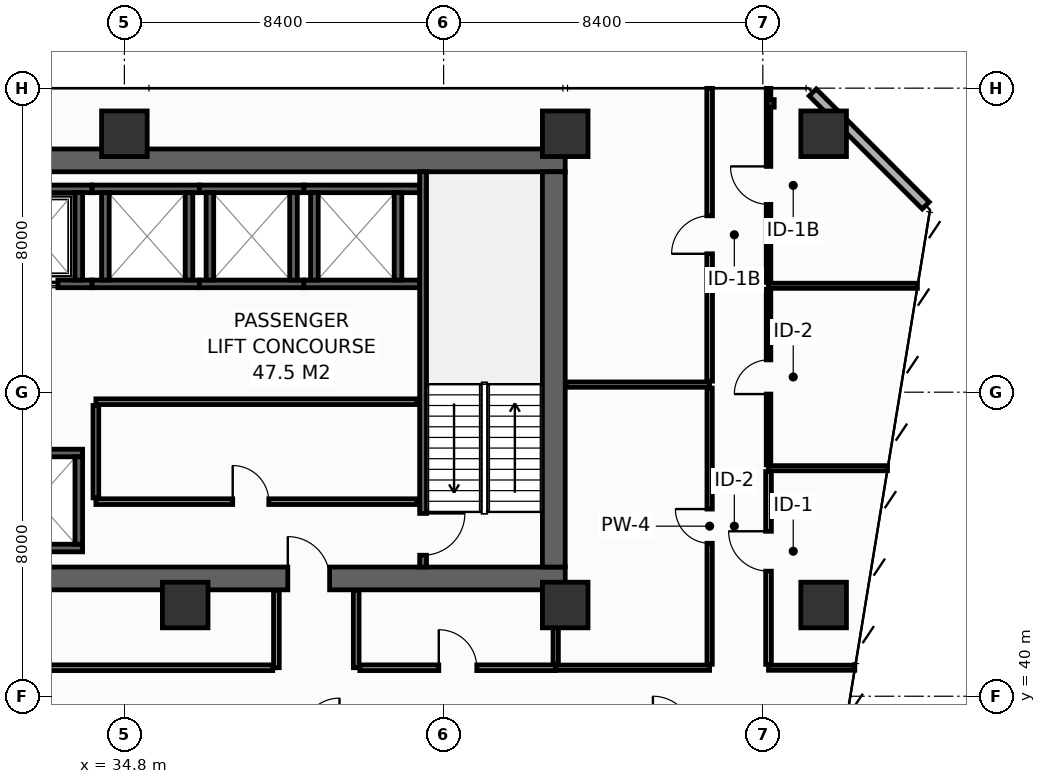
"""IFC4 building model, lengths in metres.
Left out: names, types, materials, properties, quantities, classifications, styles, units other than length and angle.
Written with IfcOpenShell. Run it as: python <this file> out.ifc"""

import sys

from ifc_helpers import new_model, si_unit, direction, frame, frame_2d, origin, origin_2d, place, context, subcontext, project, spatial, rectangle, hollow_rectangle, extrude, element, fill, save


model = new_model("IFC4")
c1 = context("Model", 3, precision=1e-05, world=origin(), true_north=direction((0.0, 1.0)))
c2 = subcontext(c1, "Body", "Model", "MODEL_VIEW")
j1 = project(units=[si_unit("LENGTHUNIT", "METRE"), si_unit("PLANEANGLEUNIT", "RADIAN")], contexts=[c1])
p1 = place(None, origin())
s1 = spatial("IfcSite", under=j1, at=p1, CompositionType="ELEMENT")
p2 = place(p1, origin())
s2 = spatial("IfcBuilding", under=s1, at=p2, CompositionType="ELEMENT")
p3 = place(p2, frame((0.0, 0.0, 82.4)))
s3 = spatial("IfcBuildingStorey", under=s2, at=p3, CompositionType="ELEMENT", Elevation=82.4)
p4 = place(p3, frame((13.5, 43.1, 0.0), z_axis=(0.0, 0.0, 1.0), x_axis=(1.0, 0.0, 0.0)))
e1 = element("IfcWall", 1, at=p4, inside=s3, PredefinedType="SHEAR", context=c2, shape_type="SweptSolid", body=[
    extrude(rectangle(XDim=32.9, YDim=0.6, at=frame_2d((16.45, 0.0))), origin(), (0.0, 0.0, 1.0), 3.95),
])
p5 = place(p4, frame((5.4, 0.0, 0.0)))
e2 = element("IfcOpeningElement", 2, at=p5, cuts=e1, PredefinedType="OPENING", context=c2, shape_type="SweptSolid", body=[
    extrude(rectangle(XDim=1.1, YDim=2.15, at=frame_2d((0.55, 1.075))), frame((0.0, 0.31, 0.0), z_axis=(0.0, -1.0, 0.0), x_axis=(1.0, 0.0, 0.0)), (0.0, 0.0, 1.0), 0.62),
])
p6 = place(p4, frame((25.6, 0.0, 0.0)))
e3 = element("IfcOpeningElement", 3, at=p6, cuts=e1, PredefinedType="OPENING", context=c2, shape_type="SweptSolid", body=[
    extrude(rectangle(XDim=1.1, YDim=2.15, at=frame_2d((0.55, 1.075))), frame((0.0, 0.31, 0.0), z_axis=(0.0, -1.0, 0.0), x_axis=(1.0, 0.0, 0.0)), (0.0, 0.0, 1.0), 0.62),
])
p7 = place(p3, frame((13.5, 54.1, 0.0), z_axis=(0.0, 0.0, 1.0), x_axis=(1.0, 0.0, 0.0)))
e4 = element("IfcWall", 4, at=p7, inside=s3, PredefinedType="SHEAR", context=c2, shape_type="SweptSolid", body=[
    extrude(rectangle(XDim=32.9, YDim=0.6, at=frame_2d((16.45, 0.0))), origin(), (0.0, 0.0, 1.0), 3.95),
])
p8 = place(p3, frame((46.1, 43.4, 0.0), z_axis=(0.0, 0.0, 1.0), x_axis=(0.0, 1.0, 0.0)))
e5 = element("IfcWall", 5, at=p8, inside=s3, PredefinedType="SHEAR", context=c2, shape_type="SweptSolid", body=[
    extrude(rectangle(XDim=10.4, YDim=0.6, at=frame_2d((5.2, 0.0))), origin(), (0.0, 0.0, 1.0), 3.95),
])
for number, where, z_axis, x_axis in (
    (6, (34.8, 54.8, 0.0), (0.0, 0.0, 1.0), (1.0, 0.0, 0.0)),
    (7, (46.4, 54.8, 0.0), (0.0, 0.0, 1.0), (1.0, 0.0, 0.0)),
    (8, (53.2, 54.8, 0.0), (0.0, 0.0, 1.0), (1.0, 0.0, 0.0)),
    (9, (36.4, 42.4, 0.0), (0.0, 0.0, 1.0), (1.0, 0.0, 0.0)),
    (10, (46.4, 42.4, 0.0), (0.0, 0.0, 1.0), (1.0, 0.0, 0.0)),
    (11, (53.2, 42.4, 0.0), (0.0, 0.0, 1.0), (1.0, 0.0, 0.0)),
):
    element("IfcColumn", number, at=place(p3, frame(where, z_axis=z_axis, x_axis=x_axis)), inside=s3, PredefinedType="COLUMN", context=c2, shape_type="SweptSolid", body=[
        extrude(hollow_rectangle(XDim=1.2, YDim=1.2, WallThickness=0.055, at=origin_2d()), origin(), (0.0, 0.0, 1.0), 4.4),
    ])
p9 = place(p3, frame((51.8, 55.6, 0.0), z_axis=(0.0, 0.0, 1.0), x_axis=(1.0, 0.0, 0.0)))
e12 = element("IfcColumn", 12, at=p9, inside=s3, PredefinedType="PILASTER", context=c2, shape_type="SweptSolid", body=[
    extrude(hollow_rectangle(XDim=0.2, YDim=0.2, WallThickness=0.01, at=origin_2d()), origin(), (0.0, 0.0, 1.0), 4.4),
])
p10 = place(p3, frame((31.125, 50.85, 0.0), z_axis=(0.0, 0.0, 1.0), x_axis=(1.0, 0.0, 0.0)))
e13 = element("IfcWall", 13, at=p10, inside=s3, PredefinedType="SHEAR", context=c2, shape_type="SweptSolid", body=[
    extrude(rectangle(XDim=2.825, YDim=0.2, at=frame_2d((1.413, 0.0))), origin(), (0.0, 0.0, 1.0), 3.95),
])
p11 = place(p10, frame((0.825, 0.0, 0.0)))
e14 = element("IfcOpeningElement", 14, at=p11, cuts=e13, PredefinedType="OPENING", context=c2, shape_type="SweptSolid", body=[
    extrude(rectangle(XDim=1.1, YDim=2.2, at=frame_2d((0.55, 1.1))), frame((0.0, 0.11, 0.0), z_axis=(0.0, -1.0, 0.0), x_axis=(1.0, 0.0, 0.0)), (0.0, 0.0, 1.0), 0.22),
])
p12 = place(p3, frame((31.125, 53.35, 0.0), z_axis=(0.0, 0.0, 1.0), x_axis=(1.0, 0.0, 0.0)))
e15 = element("IfcWall", 15, at=p12, inside=s3, PredefinedType="SHEAR", context=c2, shape_type="SweptSolid", body=[
    extrude(rectangle(XDim=2.825, YDim=0.2, at=frame_2d((1.413, 0.0))), origin(), (0.0, 0.0, 1.0), 3.95),
])
p13 = place(p3, frame((33.6, 50.95, 0.0), z_axis=(0.0, 0.0, 1.0), x_axis=(0.0, 1.0, 0.0)))
e16 = element("IfcWall", 16, at=p13, inside=s3, PredefinedType="SHEAR", context=c2, shape_type="SweptSolid", body=[
    extrude(rectangle(XDim=2.3, YDim=0.2, at=frame_2d((1.15, 0.0))), origin(), (0.0, 0.0, 1.0), 3.95),
])
for number, where, z_axis, x_axis in (
    (17, (31.125, 43.9, 0.0), (0.0, 0.0, 1.0), (1.0, 0.0, 0.0)),
    (18, (31.125, 46.4, 0.0), (0.0, 0.0, 1.0), (1.0, 0.0, 0.0)),
):
    element("IfcWall", number, at=place(p3, frame(where, z_axis=z_axis, x_axis=x_axis)), inside=s3, PredefinedType="SHEAR", context=c2, shape_type="SweptSolid", body=[
        extrude(rectangle(XDim=2.575, YDim=0.2, at=frame_2d((1.288, 0.0))), origin(), (0.0, 0.0, 1.0), 3.95),
    ])
p14 = place(p3, frame((33.6, 44.0, 0.0), z_axis=(0.0, 0.0, 1.0), x_axis=(0.0, 1.0, 0.0)))
e19 = element("IfcWall", 19, at=p14, inside=s3, PredefinedType="SHEAR", context=c2, shape_type="SweptSolid", body=[
    extrude(rectangle(XDim=2.3, YDim=0.2, at=frame_2d((1.15, 0.0))), origin(), (0.0, 0.0, 1.0), 3.95),
])
for number, where, z_axis, x_axis in (
    (20, (33.95, 50.85, 0.0), (0.0, 0.0, 1.0), (1.0, 0.0, 0.0)),
    (21, (33.95, 53.35, 0.0), (0.0, 0.0, 1.0), (1.0, 0.0, 0.0)),
):
    element("IfcWall", number, at=place(p3, frame(where, z_axis=z_axis, x_axis=x_axis)), inside=s3, PredefinedType="SHEAR", context=c2, shape_type="SweptSolid", body=[
        extrude(rectangle(XDim=2.825, YDim=0.2, at=frame_2d((1.413, 0.0))), origin(), (0.0, 0.0, 1.0), 3.95),
    ])
for number, where, z_axis, x_axis in (
    (22, (34.3, 50.95, 0.0), (0.0, 0.0, 1.0), (0.0, 1.0, 0.0)),
    (23, (36.5, 50.95, 0.0), (0.0, 0.0, 1.0), (0.0, 1.0, 0.0)),
):
    element("IfcWall", number, at=place(p3, frame(where, z_axis=z_axis, x_axis=x_axis)), inside=s3, PredefinedType="SHEAR", context=c2, shape_type="SweptSolid", body=[
        extrude(rectangle(XDim=2.3, YDim=0.2, at=frame_2d((1.15, 0.0))), origin(), (0.0, 0.0, 1.0), 3.95),
    ])
for number, where, z_axis, x_axis in (
    (24, (36.775, 50.85, 0.0), (0.0, 0.0, 1.0), (1.0, 0.0, 0.0)),
    (25, (36.775, 53.35, 0.0), (0.0, 0.0, 1.0), (1.0, 0.0, 0.0)),
):
    element("IfcWall", number, at=place(p3, frame(where, z_axis=z_axis, x_axis=x_axis)), inside=s3, PredefinedType="SHEAR", context=c2, shape_type="SweptSolid", body=[
        extrude(rectangle(XDim=2.75, YDim=0.2, at=frame_2d((1.375, 0.0))), origin(), (0.0, 0.0, 1.0), 3.95),
    ])
for number, where, z_axis, x_axis in (
    (26, (37.05, 50.95, 0.0), (0.0, 0.0, 1.0), (0.0, 1.0, 0.0)),
    (27, (39.25, 50.95, 0.0), (0.0, 0.0, 1.0), (0.0, 1.0, 0.0)),
):
    element("IfcWall", number, at=place(p3, frame(where, z_axis=z_axis, x_axis=x_axis)), inside=s3, PredefinedType="SHEAR", context=c2, shape_type="SweptSolid", body=[
        extrude(rectangle(XDim=2.3, YDim=0.2, at=frame_2d((1.15, 0.0))), origin(), (0.0, 0.0, 1.0), 3.95),
    ])
for number, where, z_axis, x_axis in (
    (28, (39.525, 50.85, 0.0), (0.0, 0.0, 1.0), (1.0, 0.0, 0.0)),
    (29, (39.525, 53.35, 0.0), (0.0, 0.0, 1.0), (1.0, 0.0, 0.0)),
):
    element("IfcWall", number, at=place(p3, frame(where, z_axis=z_axis, x_axis=x_axis)), inside=s3, PredefinedType="SHEAR", context=c2, shape_type="SweptSolid", body=[
        extrude(rectangle(XDim=3.045, YDim=0.2, at=frame_2d((1.522, 0.0))), origin(), (0.0, 0.0, 1.0), 3.95),
    ])
for number, where, z_axis, x_axis in (
    (30, (39.8, 50.95, 0.0), (0.0, 0.0, 1.0), (0.0, 1.0, 0.0)),
    (31, (42.0, 50.95, 0.0), (0.0, 0.0, 1.0), (0.0, 1.0, 0.0)),
):
    element("IfcWall", number, at=place(p3, frame(where, z_axis=z_axis, x_axis=x_axis)), inside=s3, PredefinedType="SHEAR", context=c2, shape_type="SweptSolid", body=[
        extrude(rectangle(XDim=2.3, YDim=0.2, at=frame_2d((1.15, 0.0))), origin(), (0.0, 0.0, 1.0), 3.95),
    ])
p15 = place(p3, frame((42.66, 53.8, 0.0), z_axis=(0.0, 0.0, 1.0), x_axis=(0.0, -1.0, 0.0)))
e32 = element("IfcWall", 32, at=p15, inside=s3, PredefinedType="SHEAR", context=c2, shape_type="SweptSolid", body=[
    extrude(rectangle(XDim=10.4, YDim=0.18, at=frame_2d((5.2, 0.0))), origin(), (0.0, 0.0, 1.0), 3.95),
])
p16 = place(p15, frame((8.99, 0.0, 0.0)))
e33 = element("IfcOpeningElement", 33, at=p16, cuts=e32, PredefinedType="OPENING", context=c2, shape_type="SweptSolid", body=[
    extrude(rectangle(XDim=1.1, YDim=2.15, at=frame_2d((0.55, 1.075))), frame((0.0, 0.1, 0.0), z_axis=(0.0, -1.0, 0.0), x_axis=(1.0, 0.0, 0.0)), (0.0, 0.0, 1.0), 0.2),
])
p17 = place(p3, frame((34.05, 45.12, 0.0), z_axis=(0.0, 0.0, 1.0), x_axis=(1.0, 0.0, 0.0)))
e34 = element("IfcWall", 34, at=p17, inside=s3, PredefinedType="PARTITIONING", context=c2, shape_type="SweptSolid", body=[
    extrude(rectangle(XDim=8.45, YDim=0.15, at=frame_2d((4.225, 0.0))), origin(), (0.0, 0.0, 1.0), 3.95),
])
p18 = place(p17, frame((3.6, 0.0, 0.0)))
e35 = element("IfcOpeningElement", 35, at=p18, cuts=e34, PredefinedType="OPENING", context=c2, shape_type="SweptSolid", body=[
    extrude(rectangle(XDim=0.95, YDim=2.15, at=frame_2d((0.475, 1.075))), frame((0.0, 0.085, 0.0), z_axis=(0.0, -1.0, 0.0), x_axis=(1.0, 0.0, 0.0)), (0.0, 0.0, 1.0), 0.17),
])
p19 = place(p3, frame((34.05, 47.75, 0.0), z_axis=(0.0, 0.0, 1.0), x_axis=(1.0, 0.0, 0.0)))
e36 = element("IfcWall", 36, at=p19, inside=s3, PredefinedType="PARTITIONING", context=c2, shape_type="SweptSolid", body=[
    extrude(rectangle(XDim=8.45, YDim=0.15, at=frame_2d((4.225, 0.0))), origin(), (0.0, 0.0, 1.0), 3.95),
])
p20 = place(p3, frame((34.05, 45.22, 0.0), z_axis=(0.0, 0.0, 1.0), x_axis=(0.0, 1.0, 0.0)))
e37 = element("IfcWall", 37, at=p20, inside=s3, PredefinedType="PARTITIONING", context=c2, shape_type="SweptSolid", body=[
    extrude(rectangle(XDim=2.43, YDim=0.15, at=frame_2d((1.215, 0.0))), origin(), (0.0, 0.0, 1.0), 3.95),
])
p21 = place(p3, frame((55.887, 52.913, 0.0), z_axis=(0.0, 0.0, 1.0), x_axis=(-0.707106781187, 0.707106781187, 0.0)))
e38 = element("IfcWall", 38, at=p21, inside=s3, PredefinedType="STANDARD", context=c2, shape_type="SweptSolid", body=[
    extrude(rectangle(XDim=4.206, YDim=0.26, at=frame_2d((2.103, 0.0))), origin(), (0.0, 0.0, 1.0), 3.95),
])
p22 = place(p3, frame((46.15, 40.75, 0.0), z_axis=(0.0, 0.0, 1.0), x_axis=(1.0, 0.0, 0.0)))
e39 = element("IfcWall", 39, at=p22, inside=s3, PredefinedType="PARTITIONING", context=c2, shape_type="SweptSolid", body=[
    extrude(rectangle(XDim=4.05, YDim=0.14, at=frame_2d((2.025, 0.0))), origin(), (0.0, 0.0, 1.0), 3.95),
])
p23 = place(p3, frame((46.15, 40.84, 0.0), z_axis=(0.0, 0.0, 1.0), x_axis=(0.0, 1.0, 0.0)))
e40 = element("IfcWall", 40, at=p23, inside=s3, PredefinedType="PARTITIONING", context=c2, shape_type="SweptSolid", body=[
    extrude(rectangle(XDim=1.94, YDim=0.14, at=frame_2d((0.97, 0.0))), origin(), (0.0, 0.0, 1.0), 3.95),
])
p24 = place(p3, frame((46.42, 48.2, 0.0), z_axis=(0.0, 0.0, 1.0), x_axis=(1.0, 0.0, 0.0)))
e41 = element("IfcWall", 41, at=p24, inside=s3, PredefinedType="PARTITIONING", context=c2, shape_type="SweptSolid", body=[
    extrude(rectangle(XDim=3.78, YDim=0.14, at=frame_2d((1.89, 0.0))), origin(), (0.0, 0.0, 1.0), 3.95),
])
p25 = place(p3, frame((50.2, 40.84, 0.0), z_axis=(0.0, 0.0, 1.0), x_axis=(0.0, 1.0, 0.0)))
e42 = element("IfcWall", 42, at=p25, inside=s3, PredefinedType="PARTITIONING", context=c2, shape_type="SweptSolid", body=[
    extrude(rectangle(XDim=7.27, YDim=0.14, at=frame_2d((3.635, 0.0))), origin(), (0.0, 0.0, 1.0), 3.135),
])
p26 = place(p25, frame((3.185, 0.0, 0.0)))
e43 = element("IfcOpeningElement", 43, at=p26, cuts=e42, PredefinedType="OPENING", context=c2, shape_type="SweptSolid", body=[
    extrude(rectangle(XDim=0.9, YDim=2.1, at=frame_2d((0.45, 1.05))), frame((0.0, 0.08, 0.0), z_axis=(0.0, -1.0, 0.0), x_axis=(1.0, 0.0, 0.0)), (0.0, 0.0, 1.0), 0.16),
])
p27 = place(p3, frame((50.2, 48.29, 0.0), z_axis=(0.0, 0.0, 1.0), x_axis=(0.0, 1.0, 0.0)))
e44 = element("IfcWall", 44, at=p27, inside=s3, PredefinedType="PARTITIONING", context=c2, shape_type="SweptSolid", body=[
    extrude(rectangle(XDim=7.705, YDim=0.15, at=frame_2d((3.853, 0.0))), origin(), (0.0, 0.0, 1.0), 3.235),
])
p28 = place(p27, frame((3.352, 0.0, 0.0)))
e45 = element("IfcOpeningElement", 45, at=p28, cuts=e44, PredefinedType="OPENING", context=c2, shape_type="SweptSolid", body=[
    extrude(rectangle(XDim=1.0, YDim=2.15, at=frame_2d((0.5, 1.075))), frame((0.0, 0.085, 0.0), z_axis=(0.0, -1.0, 0.0), x_axis=(1.0, 0.0, 0.0)), (0.0, 0.0, 1.0), 0.17),
])
p29 = place(p3, frame((51.75, 40.75, 0.0), z_axis=(0.0, 0.0, 1.0), x_axis=(1.0, 0.0, 0.0)))
e46 = element("IfcWall", 46, at=p29, inside=s3, PredefinedType="PARTITIONING", context=c2, shape_type="SweptSolid", body=[
    extrude(rectangle(XDim=2.271, YDim=0.135, at=frame_2d((1.135, 0.0))), origin(), (0.0, 0.0, 1.0), 3.435),
])
p30 = place(p3, frame((51.75, 46.0, 0.0), z_axis=(0.0, 0.0, 1.0), x_axis=(1.0, 0.0, 0.0)))
e47 = element("IfcWall", 47, at=p30, inside=s3, PredefinedType="PARTITIONING", context=c2, shape_type="SweptSolid", body=[
    extrude(rectangle(XDim=3.131, YDim=0.135, at=frame_2d((1.565, 0.0))), origin(), (0.0, 0.0, 1.0), 3.135),
])
p31 = place(p3, frame((51.75, 50.8, 0.0), z_axis=(0.0, 0.0, 1.0), x_axis=(1.0, 0.0, 0.0)))
e48 = element("IfcWall", 48, at=p31, inside=s3, PredefinedType="PARTITIONING", context=c2, shape_type="SweptSolid", body=[
    extrude(rectangle(XDim=3.917, YDim=0.135, at=frame_2d((1.958, 0.0))), origin(), (0.0, 0.0, 1.0), 3.135),
])
p32 = place(p3, frame((51.75, 40.837, 0.0), z_axis=(0.0, 0.0, 1.0), x_axis=(0.0, 1.0, 0.0)))
e49 = element("IfcWall", 49, at=p32, inside=s3, PredefinedType="PARTITIONING", context=c2, shape_type="SweptSolid", body=[
    extrude(rectangle(XDim=5.075, YDim=0.15, at=frame_2d((2.538, 0.0))), origin(), (0.0, 0.0, 1.0), 3.135),
])
p33 = place(p32, frame((2.453, 0.0, 0.0)))
e50 = element("IfcOpeningElement", 50, at=p33, cuts=e49, PredefinedType="OPENING", context=c2, shape_type="SweptSolid", body=[
    extrude(rectangle(XDim=1.05, YDim=2.15, at=frame_2d((0.525, 1.075))), frame((0.0, 0.085, 0.0), z_axis=(0.0, -1.0, 0.0), x_axis=(1.0, 0.0, 0.0)), (0.0, 0.0, 1.0), 0.17),
])
p34 = place(p3, frame((51.75, 46.087, 0.0), z_axis=(0.0, 0.0, 1.0), x_axis=(0.0, 1.0, 0.0)))
e51 = element("IfcWall", 51, at=p34, inside=s3, PredefinedType="PARTITIONING", context=c2, shape_type="SweptSolid", body=[
    extrude(rectangle(XDim=4.625, YDim=0.12, at=frame_2d((2.312, 0.0))), origin(), (0.0, 0.0, 1.0), 3.95),
])
p35 = place(p34, frame((1.863, 0.0, 0.0)))
e52 = element("IfcOpeningElement", 52, at=p35, cuts=e51, PredefinedType="OPENING", context=c2, shape_type="SweptSolid", body=[
    extrude(rectangle(XDim=0.9, YDim=2.1, at=frame_2d((0.45, 1.05))), frame((0.0, 0.07, 0.0), z_axis=(0.0, -1.0, 0.0), x_axis=(1.0, 0.0, 0.0)), (0.0, 0.0, 1.0), 0.14),
])
p36 = place(p3, frame((51.75, 50.887, 0.0), z_axis=(0.0, 0.0, 1.0), x_axis=(0.0, 1.0, 0.0)))
e53 = element("IfcWall", 53, at=p36, inside=s3, PredefinedType="PARTITIONING", context=c2, shape_type="SweptSolid", body=[
    extrude(rectangle(XDim=5.108, YDim=0.12, at=frame_2d((2.554, 0.0))), origin(), (0.0, 0.0, 1.0), 3.235),
])
p37 = place(p36, frame((2.054, 0.0, 0.0)))
e54 = element("IfcOpeningElement", 54, at=p37, cuts=e53, PredefinedType="OPENING", context=c2, shape_type="SweptSolid", body=[
    extrude(rectangle(XDim=1.0, YDim=2.15, at=frame_2d((0.5, 1.075))), frame((0.0, 0.07, 0.0), z_axis=(0.0, -1.0, 0.0), x_axis=(1.0, 0.0, 0.0)), (0.0, 0.0, 1.0), 0.14),
])
for number, where, z_axis, x_axis in (
    (55, (38.8, 40.75, 0.0), (0.0, 0.0, 1.0), (0.0, 1.0, 0.0)),
    (56, (40.9, 40.75, 0.0), (0.0, 0.0, 1.0), (0.0, 1.0, 0.0)),
):
    element("IfcWall", number, at=place(p3, frame(where, z_axis=z_axis, x_axis=x_axis)), inside=s3, PredefinedType="PARTITIONING", context=c2, shape_type="SweptSolid", body=[
        extrude(rectangle(XDim=2.03, YDim=0.15, at=frame_2d((1.015, 0.0))), origin(), (0.0, 0.0, 1.0), 3.95),
    ])
p38 = place(p3, frame((20.795, 40.75, 0.0), z_axis=(0.0, 0.0, 1.0), x_axis=(1.0, 0.0, 0.0)))
e57 = element("IfcWall", 57, at=p38, inside=s3, PredefinedType="PARTITIONING", context=c2, shape_type="SweptSolid", body=[
    extrude(rectangle(XDim=17.91, YDim=0.15, at=frame_2d((8.955, 0.0))), origin(), (0.0, 0.0, 1.0), 3.135),
])
p39 = place(p38, frame((8.455, 0.0, 0.0)))
e58 = element("IfcOpeningElement", 58, at=p39, cuts=e57, PredefinedType="OPENING", context=c2, shape_type="SweptSolid", body=[
    extrude(rectangle(XDim=1.0, YDim=2.15, at=frame_2d((0.5, 1.075))), frame((0.0, 0.085, 0.0), z_axis=(0.0, -1.0, 0.0), x_axis=(1.0, 0.0, 0.0)), (0.0, 0.0, 1.0), 0.17),
])
p40 = place(p3, frame((40.995, 40.75, 0.0), z_axis=(0.0, 0.0, 1.0), x_axis=(1.0, 0.0, 0.0)))
e59 = element("IfcWall", 59, at=p40, inside=s3, PredefinedType="PARTITIONING", context=c2, shape_type="SweptSolid", body=[
    extrude(rectangle(XDim=5.155, YDim=0.15, at=frame_2d((2.577, 0.0))), origin(), (0.0, 0.0, 1.0), 3.95),
])
p41 = place(p40, frame((2.078, 0.0, 0.0)))
e60 = element("IfcOpeningElement", 60, at=p41, cuts=e59, PredefinedType="OPENING", context=c2, shape_type="SweptSolid", body=[
    extrude(rectangle(XDim=1.0, YDim=2.15, at=frame_2d((0.5, 1.075))), frame((0.0, 0.085, 0.0), z_axis=(0.0, -1.0, 0.0), x_axis=(1.0, 0.0, 0.0)), (0.0, 0.0, 1.0), 0.17),
])
p42 = place(p11, origin())
e61 = element("IfcDoor", 61, at=p42, inside=s3, OperationType="SLIDING_TO_LEFT", PredefinedType="DOOR", context=c2, shape_type="SweptSolid", body=[
    extrude(rectangle(XDim=1.1, YDim=2.2, at=frame_2d((0.55, 1.1))), frame((0.0, 0.025, 0.0), z_axis=(0.0, -1.0, 0.0), x_axis=(1.0, 0.0, 0.0)), (0.0, 0.0, 1.0), 0.05),
])
fill(e14, e61)
p43 = place(p16, origin())
e62 = element("IfcDoor", 62, at=p43, inside=s3, OperationType="SINGLE_SWING_LEFT", PredefinedType="DOOR", context=c2, shape_type="SweptSolid", body=[
    extrude(rectangle(XDim=1.1, YDim=2.15, at=frame_2d((0.55, 1.075))), frame((0.0, 0.025, 0.0), z_axis=(0.0, -1.0, 0.0), x_axis=(1.0, 0.0, 0.0)), (0.0, 0.0, 1.0), 0.05),
])
fill(e33, e62)
p44 = place(p6, origin())
e63 = element("IfcDoor", 63, at=p44, inside=s3, OperationType="SINGLE_SWING_LEFT", PredefinedType="DOOR", context=c2, shape_type="SweptSolid", body=[
    extrude(rectangle(XDim=1.1, YDim=2.15, at=frame_2d((0.55, 1.075))), frame((0.0, 0.025, 0.0), z_axis=(0.0, -1.0, 0.0), x_axis=(1.0, 0.0, 0.0)), (0.0, 0.0, 1.0), 0.05),
])
fill(e3, e63)
p45 = place(p18, origin())
e64 = element("IfcDoor", 64, at=p45, inside=s3, OperationType="SINGLE_SWING_LEFT", PredefinedType="DOOR", context=c2, shape_type="SweptSolid", body=[
    extrude(rectangle(XDim=0.95, YDim=2.15, at=frame_2d((0.475, 1.075))), frame((0.0, 0.025, 0.0), z_axis=(0.0, -1.0, 0.0), x_axis=(1.0, 0.0, 0.0)), (0.0, 0.0, 1.0), 0.05),
])
fill(e35, e64)
p46 = place(p26, origin())
e65 = element("IfcDoor", 65, at=p46, inside=s3, OperationType="SINGLE_SWING_RIGHT", PredefinedType="DOOR", context=c2, shape_type="SweptSolid", body=[
    extrude(rectangle(XDim=0.9, YDim=2.1, at=frame_2d((0.45, 1.05))), frame((0.0, 0.025, 0.0), z_axis=(0.0, -1.0, 0.0), x_axis=(1.0, 0.0, 0.0)), (0.0, 0.0, 1.0), 0.05),
])
fill(e43, e65)
p47 = place(p28, origin())
e66 = element("IfcDoor", 66, at=p47, inside=s3, OperationType="SINGLE_SWING_LEFT", PredefinedType="DOOR", context=c2, shape_type="SweptSolid", body=[
    extrude(rectangle(XDim=1.0, YDim=2.15, at=frame_2d((0.5, 1.075))), frame((0.0, 0.025, 0.0), z_axis=(0.0, -1.0, 0.0), x_axis=(1.0, 0.0, 0.0)), (0.0, 0.0, 1.0), 0.05),
])
fill(e45, e66)
p48 = place(p33, origin())
e67 = element("IfcDoor", 67, at=p48, inside=s3, OperationType="SINGLE_SWING_RIGHT", PredefinedType="DOOR", context=c2, shape_type="SweptSolid", body=[
    extrude(rectangle(XDim=1.05, YDim=2.15, at=frame_2d((0.525, 1.075))), frame((0.0, 0.025, 0.0), z_axis=(0.0, -1.0, 0.0), x_axis=(1.0, 0.0, 0.0)), (0.0, 0.0, 1.0), 0.05),
])
fill(e50, e67)
p49 = place(p35, origin())
e68 = element("IfcDoor", 68, at=p49, inside=s3, OperationType="SINGLE_SWING_LEFT", PredefinedType="DOOR", context=c2, shape_type="SweptSolid", body=[
    extrude(rectangle(XDim=0.9, YDim=2.1, at=frame_2d((0.45, 1.05))), frame((0.0, 0.025, 0.0), z_axis=(0.0, -1.0, 0.0), x_axis=(1.0, 0.0, 0.0)), (0.0, 0.0, 1.0), 0.05),
])
fill(e52, e68)
p50 = place(p37, origin())
e69 = element("IfcDoor", 69, at=p50, inside=s3, OperationType="SINGLE_SWING_RIGHT", PredefinedType="DOOR", context=c2, shape_type="SweptSolid", body=[
    extrude(rectangle(XDim=1.0, YDim=2.15, at=frame_2d((0.5, 1.075))), frame((0.0, 0.025, 0.0), z_axis=(0.0, -1.0, 0.0), x_axis=(1.0, 0.0, 0.0)), (0.0, 0.0, 1.0), 0.05),
])
fill(e54, e69)
p51 = place(p41, origin())
e70 = element("IfcDoor", 70, at=p51, inside=s3, OperationType="SINGLE_SWING_LEFT", PredefinedType="DOOR", context=c2, shape_type="SweptSolid", body=[
    extrude(rectangle(XDim=1.0, YDim=2.15, at=frame_2d((0.5, 1.075))), frame((0.0, 0.025, 0.0), z_axis=(0.0, -1.0, 0.0), x_axis=(1.0, 0.0, 0.0)), (0.0, 0.0, 1.0), 0.05),
])
fill(e60, e70)
save(model, sys.argv[1])
